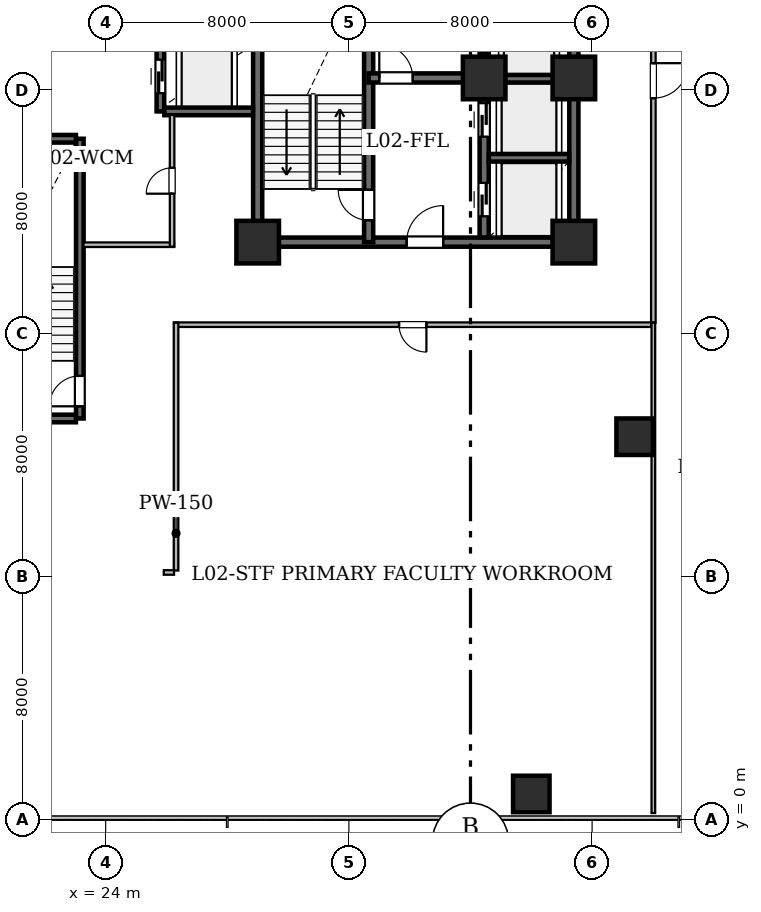
"""IFC4 building model, lengths in metres.
Left out: names, types, materials, properties, quantities, classifications, styles, units other than length and angle.
Written with IfcOpenShell. Run it as: python <this file> out.ifc"""

import sys

from ifc_helpers import new_model, si_unit, direction, frame, frame_2d, origin, origin_2d, place, context, subcontext, project, spatial, rectangle, hollow_rectangle, extrude, element, fill, save


model = new_model("IFC4")
c1 = context("Model", 3, precision=1e-05, world=origin(), true_north=direction((0.0, 1.0)))
c2 = subcontext(c1, "Body", "Model", "MODEL_VIEW")
j1 = project(units=[si_unit("LENGTHUNIT", "METRE"), si_unit("PLANEANGLEUNIT", "RADIAN")], contexts=[c1])
p1 = place(None, origin())
s1 = spatial("IfcSite", under=j1, at=p1, CompositionType="ELEMENT")
p2 = place(p1, origin())
s2 = spatial("IfcBuilding", under=s1, at=p2, CompositionType="ELEMENT")
p3 = place(p2, frame((0.0, 0.0, 12.0)))
s3 = spatial("IfcBuildingStorey", under=s2, at=p3, CompositionType="ELEMENT", Elevation=12.0)
for number, where, z_axis, x_axis in (
    (1, (29.0, 19.0, 0.0), (0.0, 0.0, 1.0), (1.0, 0.0, 0.0)),
    (2, (39.4, 19.0, 0.0), (0.0, 0.0, 1.0), (1.0, 0.0, 0.0)),
    (3, (36.45, 24.4, 0.0), (0.0, 0.0, 1.0), (1.0, 0.0, 0.0)),
    (4, (39.4, 24.4, 0.0), (0.0, 0.0, 1.0), (1.0, 0.0, 0.0)),
):
    element("IfcColumn", number, at=place(p3, frame(where, z_axis=z_axis, x_axis=x_axis)), inside=s3, PredefinedType="COLUMN", context=c2, shape_type="SweptSolid", body=[
        extrude(hollow_rectangle(XDim=1.4, YDim=1.4, WallThickness=0.07, at=origin_2d()), origin(), (0.0, 0.0, 1.0), 4.2),
    ])
for number, where, z_axis, x_axis in (
    (5, (38.0, 0.85, 0.0), (0.0, 0.0, 1.0), (1.0, 0.0, 0.0)),
    (6, (41.4, 12.6, 0.0), (0.0, 0.0, 1.0), (1.0, 0.0, 0.0)),
):
    element("IfcColumn", number, at=place(p3, frame(where, z_axis=z_axis, x_axis=x_axis)), inside=s3, PredefinedType="COLUMN", context=c2, shape_type="SweptSolid", body=[
        extrude(hollow_rectangle(XDim=1.2, YDim=1.2, WallThickness=0.06, at=origin_2d()), origin(), (0.0, 0.0, 1.0), 4.2),
    ])
p4 = place(p3, frame((29.0, 19.0, 0.0), z_axis=(0.0, 0.0, 1.0), x_axis=(0.0, 1.0, 0.0)))
e7 = element("IfcWall", 7, at=p4, inside=s3, PredefinedType="SHEAR", context=c2, shape_type="SweptSolid", body=[
    extrude(rectangle(XDim=9.0, YDim=0.3, at=frame_2d((4.5, 0.0))), origin(), (0.0, 0.0, 1.0), 3.92),
])
p5 = place(p3, frame((29.0, 19.0, 0.0), z_axis=(0.0, 0.0, 1.0), x_axis=(1.0, 0.0, 0.0)))
e8 = element("IfcWall", 8, at=p5, inside=s3, PredefinedType="SHEAR", context=c2, shape_type="SweptSolid", body=[
    extrude(rectangle(XDim=10.4, YDim=0.3, at=frame_2d((5.2, 0.0))), origin(), (0.0, 0.0, 1.0), 3.92),
])
p6 = place(p5, frame((4.9, 0.0, 0.0)))
e9 = element("IfcOpeningElement", 9, at=p6, cuts=e8, PredefinedType="OPENING", context=c2, shape_type="SweptSolid", body=[
    extrude(rectangle(XDim=1.2, YDim=2.15, at=frame_2d((0.6, 1.075))), frame((0.0, 0.16, 0.0), z_axis=(0.0, -1.0, 0.0), x_axis=(1.0, 0.0, 0.0)), (0.0, 0.0, 1.0), 0.32),
])
p7 = place(p3, frame((39.4, 19.0, 0.0), z_axis=(0.0, 0.0, 1.0), x_axis=(0.0, 1.0, 0.0)))
e10 = element("IfcWall", 10, at=p7, inside=s3, PredefinedType="SHEAR", context=c2, shape_type="SweptSolid", body=[
    extrude(rectangle(XDim=5.4, YDim=0.3, at=frame_2d((2.7, 0.0))), origin(), (0.0, 0.0, 1.0), 3.92),
])
p8 = place(p3, frame((39.4, 24.4, 0.0), z_axis=(0.0, 0.0, 1.0), x_axis=(0.0, 1.0, 0.0)))
e11 = element("IfcWall", 11, at=p8, inside=s3, PredefinedType="SHEAR", context=c2, shape_type="SweptSolid", body=[
    extrude(rectangle(XDim=12.6, YDim=0.3, at=frame_2d((6.3, 0.0))), origin(), (0.0, 0.0, 1.0), 3.92),
])
p9 = place(p3, frame((32.65, 19.0, 0.0), z_axis=(0.0, 0.0, 1.0), x_axis=(0.0, 1.0, 0.0)))
e12 = element("IfcWall", 12, at=p9, inside=s3, PredefinedType="SHEAR", context=c2, shape_type="SweptSolid", body=[
    extrude(rectangle(XDim=9.0, YDim=0.3, at=frame_2d((4.5, 0.0))), origin(), (0.0, 0.0, 1.0), 3.92),
])
p10 = place(p9, frame((0.72, 0.0, 0.0)))
e13 = element("IfcOpeningElement", 13, at=p10, cuts=e12, PredefinedType="OPENING", context=c2, shape_type="SweptSolid", body=[
    extrude(rectangle(XDim=1.0, YDim=2.15, at=frame_2d((0.5, 1.075))), frame((0.0, 0.16, 0.0), z_axis=(0.0, -1.0, 0.0), x_axis=(1.0, 0.0, 0.0)), (0.0, 0.0, 1.0), 0.32),
])
p11 = place(p3, frame((32.65, 24.4, 0.0), z_axis=(0.0, 0.0, 1.0), x_axis=(1.0, 0.0, 0.0)))
e14 = element("IfcWall", 14, at=p11, inside=s3, PredefinedType="SHEAR", context=c2, shape_type="SweptSolid", body=[
    extrude(rectangle(XDim=3.8, YDim=0.3, at=frame_2d((1.9, 0.0))), origin(), (0.0, 0.0, 1.0), 3.92),
])
p12 = place(p11, frame((0.35, 0.0, 0.0)))
e15 = element("IfcOpeningElement", 15, at=p12, cuts=e14, PredefinedType="OPENING", context=c2, shape_type="SweptSolid", body=[
    extrude(rectangle(XDim=1.1, YDim=2.15, at=frame_2d((0.55, 1.075))), frame((0.0, 0.16, 0.0), z_axis=(0.0, -1.0, 0.0), x_axis=(1.0, 0.0, 0.0)), (0.0, 0.0, 1.0), 0.32),
])
p13 = place(p3, frame((36.45, 19.154, 0.0), z_axis=(0.0, 0.0, 1.0), x_axis=(0.0, 1.0, 0.0)))
e16 = element("IfcWall", 16, at=p13, inside=s3, PredefinedType="SHEAR", context=c2, shape_type="SweptSolid", body=[
    extrude(rectangle(XDim=4.546, YDim=0.3, at=frame_2d((2.273, 0.0))), origin(), (0.0, 0.0, 1.0), 3.92),
])
p14 = place(p13, frame((0.696, 0.0, 0.0)))
e17 = element("IfcOpeningElement", 17, at=p14, cuts=e16, PredefinedType="OPENING", context=c2, shape_type="SweptSolid", body=[
    extrude(rectangle(XDim=1.1, YDim=2.15, at=frame_2d((0.55, 1.075))), frame((0.0, 0.16, 0.0), z_axis=(0.0, -1.0, 0.0), x_axis=(1.0, 0.0, 0.0)), (0.0, 0.0, 1.0), 0.32),
])
p15 = place(p13, frame((3.316, 0.0, 0.0)))
e18 = element("IfcOpeningElement", 18, at=p15, cuts=e16, PredefinedType="OPENING", context=c2, shape_type="SweptSolid", body=[
    extrude(rectangle(XDim=1.1, YDim=2.15, at=frame_2d((0.55, 1.075))), frame((0.0, 0.16, 0.0), z_axis=(0.0, -1.0, 0.0), x_axis=(1.0, 0.0, 0.0)), (0.0, 0.0, 1.0), 0.32),
])
p16 = place(p3, frame((36.45, 25.1, 0.0), z_axis=(0.0, 0.0, 1.0), x_axis=(0.0, 1.0, 0.0)))
e19 = element("IfcWall", 19, at=p16, inside=s3, PredefinedType="SHEAR", context=c2, shape_type="SweptSolid", body=[
    extrude(rectangle(XDim=4.95, YDim=0.3, at=frame_2d((2.475, 0.0))), origin(), (0.0, 0.0, 1.0), 3.92),
])
p17 = place(p16, frame((0.12, 0.0, 0.0)))
e20 = element("IfcOpeningElement", 20, at=p17, cuts=e19, PredefinedType="OPENING", context=c2, shape_type="SweptSolid", body=[
    extrude(rectangle(XDim=1.05, YDim=2.15, at=frame_2d((0.525, 1.075))), frame((0.0, 0.16, 0.0), z_axis=(0.0, -1.0, 0.0), x_axis=(1.0, 0.0, 0.0)), (0.0, 0.0, 1.0), 0.32),
])
p18 = place(p16, frame((1.995, 0.0, 0.0)))
e21 = element("IfcOpeningElement", 21, at=p18, cuts=e19, PredefinedType="OPENING", context=c2, shape_type="SweptSolid", body=[
    extrude(rectangle(XDim=1.05, YDim=2.15, at=frame_2d((0.525, 1.075))), frame((0.0, 0.16, 0.0), z_axis=(0.0, -1.0, 0.0), x_axis=(1.0, 0.0, 0.0)), (0.0, 0.0, 1.0), 0.32),
])
p19 = place(p16, frame((3.795, 0.0, 0.0)))
e22 = element("IfcOpeningElement", 22, at=p19, cuts=e19, PredefinedType="OPENING", context=c2, shape_type="SweptSolid", body=[
    extrude(rectangle(XDim=1.05, YDim=2.15, at=frame_2d((0.525, 1.075))), frame((0.0, 0.16, 0.0), z_axis=(0.0, -1.0, 0.0), x_axis=(1.0, 0.0, 0.0)), (0.0, 0.0, 1.0), 0.32),
])
for number, where, z_axis, x_axis in (
    (23, (36.604, 21.775, 0.0), (0.0, 0.0, 1.0), (1.0, 0.0, 0.0)),
    (24, (36.604, 24.375, 0.0), (0.0, 0.0, 1.0), (1.0, 0.0, 0.0)),
):
    element("IfcWall", number, at=place(p3, frame(where, z_axis=z_axis, x_axis=x_axis)), inside=s3, PredefinedType="SHEAR", context=c2, shape_type="SweptSolid", body=[
        extrude(rectangle(XDim=2.642, YDim=0.25, at=frame_2d((1.321, 0.0))), origin(), (0.0, 0.0, 1.0), 3.92),
    ])
p20 = place(p3, frame((23.15, 13.2, 0.0), z_axis=(0.0, 0.0, 1.0), x_axis=(0.0, 1.0, 0.0)))
e25 = element("IfcWall", 25, at=p20, inside=s3, PredefinedType="SHEAR", context=c2, shape_type="SweptSolid", body=[
    extrude(rectangle(XDim=9.2, YDim=0.25, at=frame_2d((4.6, 0.0))), origin(), (0.0, 0.0, 1.0), 3.92),
])
p21 = place(p20, frame((0.4, 0.0, 0.0)))
e26 = element("IfcOpeningElement", 26, at=p21, cuts=e25, PredefinedType="OPENING", context=c2, shape_type="SweptSolid", body=[
    extrude(rectangle(XDim=1.0, YDim=2.15, at=frame_2d((0.5, 1.075))), frame((0.0, 0.135, 0.0), z_axis=(0.0, -1.0, 0.0), x_axis=(1.0, 0.0, 0.0)), (0.0, 0.0, 1.0), 0.27),
])
for number, where, z_axis, x_axis in (
    (27, (19.329, 13.2, 0.0), (0.0, 0.0, 1.0), (1.0, 0.0, 0.0)),
    (28, (19.329, 22.4, 0.0), (0.0, 0.0, 1.0), (1.0, 0.0, 0.0)),
):
    element("IfcWall", number, at=place(p3, frame(where, z_axis=z_axis, x_axis=x_axis)), inside=s3, PredefinedType="SHEAR", context=c2, shape_type="SweptSolid", body=[
        extrude(rectangle(XDim=3.692, YDim=0.25, at=frame_2d((1.846, 0.0))), origin(), (0.0, 0.0, 1.0), 3.92),
    ])
p22 = place(p3, frame((25.8, 23.3, 0.0), z_axis=(0.0, 0.0, 1.0), x_axis=(0.0, 1.0, 0.0)))
e29 = element("IfcWall", 29, at=p22, inside=s3, PredefinedType="SHEAR", context=c2, shape_type="SweptSolid", body=[
    extrude(rectangle(XDim=4.55, YDim=0.25, at=frame_2d((2.275, 0.0))), origin(), (0.0, 0.0, 1.0), 3.92),
])
p23 = place(p22, frame((0.6, 0.0, 0.0)))
e30 = element("IfcOpeningElement", 30, at=p23, cuts=e29, PredefinedType="OPENING", context=c2, shape_type="SweptSolid", body=[
    extrude(rectangle(XDim=1.1, YDim=2.15, at=frame_2d((0.55, 1.075))), frame((0.0, 0.135, 0.0), z_axis=(0.0, -1.0, 0.0), x_axis=(1.0, 0.0, 0.0)), (0.0, 0.0, 1.0), 0.27),
])
p24 = place(p22, frame((2.85, 0.0, 0.0)))
e31 = element("IfcOpeningElement", 31, at=p24, cuts=e29, PredefinedType="OPENING", context=c2, shape_type="SweptSolid", body=[
    extrude(rectangle(XDim=1.1, YDim=2.15, at=frame_2d((0.55, 1.075))), frame((0.0, 0.135, 0.0), z_axis=(0.0, -1.0, 0.0), x_axis=(1.0, 0.0, 0.0)), (0.0, 0.0, 1.0), 0.27),
])
p25 = place(p3, frame((25.929, 23.3, 0.0), z_axis=(0.0, 0.0, 1.0), x_axis=(1.0, 0.0, 0.0)))
e32 = element("IfcWall", 32, at=p25, inside=s3, PredefinedType="SHEAR", context=c2, shape_type="SweptSolid", body=[
    extrude(rectangle(XDim=2.917, YDim=0.25, at=frame_2d((1.458, 0.0))), origin(), (0.0, 0.0, 1.0), 3.92),
])
p26 = place(p3, frame((23.267, 18.915, 0.0), z_axis=(0.0, 0.0, 1.0), x_axis=(1.0, 0.0, 0.0)))
e33 = element("IfcWall", 33, at=p26, inside=s3, PredefinedType="STANDARD", context=c2, shape_type="SweptSolid", body=[
    extrude(rectangle(XDim=2.983, YDim=0.15, at=frame_2d((1.491, 0.0))), origin(), (0.0, 0.0, 1.0), 3.92),
])
p27 = place(p3, frame((26.185, 18.852, 0.0), z_axis=(0.0, 0.0, 1.0), x_axis=(0.0, 1.0, 0.0)))
e34 = element("IfcWall", 34, at=p27, inside=s3, PredefinedType="STANDARD", context=c2, shape_type="SweptSolid", body=[
    extrude(rectangle(XDim=4.331, YDim=0.15, at=frame_2d((2.166, 0.0))), origin(), (0.0, 0.0, 1.0), 3.92),
])
p28 = place(p27, frame((1.741, 0.0, 0.0)))
e35 = element("IfcOpeningElement", 35, at=p28, cuts=e34, PredefinedType="OPENING", context=c2, shape_type="SweptSolid", body=[
    extrude(rectangle(XDim=0.85, YDim=2.1, at=frame_2d((0.425, 1.05))), frame((0.0, 0.085, 0.0), z_axis=(0.0, -1.0, 0.0), x_axis=(1.0, 0.0, 0.0)), (0.0, 0.0, 1.0), 0.17),
])
p29 = place(p3, frame((42.015, 32.314, 0.0), z_axis=(0.0, 0.0, 1.0), x_axis=(0.0, -1.0, 0.0)))
e36 = element("IfcWall", 36, at=p29, inside=s3, PredefinedType="STANDARD", context=c2, shape_type="SweptSolid", body=[
    extrude(rectangle(XDim=15.964, YDim=0.15, at=frame_2d((7.982, 0.0))), origin(), (0.0, 0.0, 1.0), 3.055),
])
p30 = place(p29, frame((7.428, 0.0, 0.0)))
e37 = element("IfcOpeningElement", 37, at=p30, cuts=e36, PredefinedType="OPENING", context=c2, shape_type="SweptSolid", body=[
    extrude(rectangle(XDim=1.15, YDim=2.2, at=frame_2d((0.575, 1.1))), frame((0.0, 0.085, 0.0), z_axis=(0.0, -1.0, 0.0), x_axis=(1.0, 0.0, 0.0)), (0.0, 0.0, 1.0), 0.17),
])
p31 = place(p3, frame((41.95, 16.285, 0.0), z_axis=(0.0, 0.0, 1.0), x_axis=(-1.0, 0.0, 0.0)))
e38 = element("IfcWall", 38, at=p31, inside=s3, PredefinedType="STANDARD", context=c2, shape_type="SweptSolid", body=[
    extrude(rectangle(XDim=15.7, YDim=0.15, at=frame_2d((7.85, 0.0))), origin(), (0.0, 0.0, 1.0), 3.055),
])
p32 = place(p31, frame((7.4, 0.0, 0.0)))
e39 = element("IfcOpeningElement", 39, at=p32, cuts=e38, PredefinedType="OPENING", context=c2, shape_type="SweptSolid", body=[
    extrude(rectangle(XDim=0.9, YDim=2.1, at=frame_2d((0.45, 1.05))), frame((0.0, 0.085, 0.0), z_axis=(0.0, -1.0, 0.0), x_axis=(1.0, 0.0, 0.0)), (0.0, 0.0, 1.0), 0.17),
])
p33 = place(p3, frame((26.315, 16.35, 0.0), z_axis=(0.0, 0.0, 1.0), x_axis=(0.0, -1.0, 0.0)))
e40 = element("IfcWall", 40, at=p33, inside=s3, PredefinedType="STANDARD", context=c2, shape_type="SweptSolid", body=[
    extrude(rectangle(XDim=8.15, YDim=0.15, at=frame_2d((4.075, 0.0))), origin(), (0.0, 0.0, 1.0), 3.055),
])
p34 = place(p3, frame((26.25, 8.135, 0.0), z_axis=(0.0, 0.0, 1.0), x_axis=(-1.0, 0.0, 0.0)))
e41 = element("IfcWall", 41, at=p34, inside=s3, PredefinedType="STANDARD", context=c2, shape_type="SweptSolid", body=[
    extrude(rectangle(XDim=0.339, YDim=0.15, at=frame_2d((0.169, 0.0))), origin(), (0.0, 0.0, 1.0), 3.92),
])
p35 = place(p3, frame((42.015, 0.222, 0.0), z_axis=(0.0, 0.0, 1.0), x_axis=(0.0, 1.0, 0.0)))
e42 = element("IfcWall", 42, at=p35, inside=s3, PredefinedType="PARTITIONING", context=c2, shape_type="SweptSolid", body=[
    extrude(rectangle(XDim=16.128, YDim=0.12, at=frame_2d((8.064, 0.0))), origin(), (0.0, 0.0, 1.0), 3.055),
])
p36 = place(p10, origin())
e43 = element("IfcDoor", 43, at=p36, inside=s3, OperationType="SINGLE_SWING_RIGHT", PredefinedType="DOOR", context=c2, shape_type="SweptSolid", body=[
    extrude(rectangle(XDim=1.0, YDim=2.15, at=frame_2d((0.5, 1.075))), frame((0.0, 0.025, 0.0), z_axis=(0.0, -1.0, 0.0), x_axis=(1.0, 0.0, 0.0)), (0.0, 0.0, 1.0), 0.05),
])
fill(e13, e43)
p37 = place(p12, origin())
e44 = element("IfcDoor", 44, at=p37, inside=s3, OperationType="SINGLE_SWING_LEFT", PredefinedType="DOOR", context=c2, shape_type="SweptSolid", body=[
    extrude(rectangle(XDim=1.1, YDim=2.15, at=frame_2d((0.55, 1.075))), frame((0.0, 0.025, 0.0), z_axis=(0.0, -1.0, 0.0), x_axis=(1.0, 0.0, 0.0)), (0.0, 0.0, 1.0), 0.05),
])
fill(e15, e44)
p38 = place(p6, origin())
e45 = element("IfcDoor", 45, at=p38, inside=s3, OperationType="SINGLE_SWING_RIGHT", PredefinedType="DOOR", context=c2, shape_type="SweptSolid", body=[
    extrude(rectangle(XDim=1.2, YDim=2.15, at=frame_2d((0.6, 1.075))), frame((0.0, 0.025, 0.0), z_axis=(0.0, -1.0, 0.0), x_axis=(1.0, 0.0, 0.0)), (0.0, 0.0, 1.0), 0.05),
])
fill(e9, e45)
p39 = place(p14, origin())
e46 = element("IfcDoor", 46, at=p39, inside=s3, OperationType="SLIDING_TO_LEFT", PredefinedType="DOOR", context=c2, shape_type="SweptSolid", body=[
    extrude(rectangle(XDim=1.1, YDim=2.15, at=frame_2d((0.55, 1.075))), frame((0.0, 0.025, 0.0), z_axis=(0.0, -1.0, 0.0), x_axis=(1.0, 0.0, 0.0)), (0.0, 0.0, 1.0), 0.05),
])
fill(e17, e46)
p40 = place(p15, origin())
e47 = element("IfcDoor", 47, at=p40, inside=s3, OperationType="SLIDING_TO_LEFT", PredefinedType="DOOR", context=c2, shape_type="SweptSolid", body=[
    extrude(rectangle(XDim=1.1, YDim=2.15, at=frame_2d((0.55, 1.075))), frame((0.0, 0.025, 0.0), z_axis=(0.0, -1.0, 0.0), x_axis=(1.0, 0.0, 0.0)), (0.0, 0.0, 1.0), 0.05),
])
fill(e18, e47)
p41 = place(p17, origin())
e48 = element("IfcDoor", 48, at=p41, inside=s3, OperationType="SLIDING_TO_LEFT", PredefinedType="DOOR", context=c2, shape_type="SweptSolid", body=[
    extrude(rectangle(XDim=1.05, YDim=2.15, at=frame_2d((0.525, 1.075))), frame((0.0, 0.025, 0.0), z_axis=(0.0, -1.0, 0.0), x_axis=(1.0, 0.0, 0.0)), (0.0, 0.0, 1.0), 0.05),
])
fill(e20, e48)
p42 = place(p21, origin())
e49 = element("IfcDoor", 49, at=p42, inside=s3, OperationType="SINGLE_SWING_LEFT", PredefinedType="DOOR", context=c2, shape_type="SweptSolid", body=[
    extrude(rectangle(XDim=1.0, YDim=2.15, at=frame_2d((0.5, 1.075))), frame((0.0, 0.025, 0.0), z_axis=(0.0, -1.0, 0.0), x_axis=(1.0, 0.0, 0.0)), (0.0, 0.0, 1.0), 0.05),
])
fill(e26, e49)
p43 = place(p23, origin())
e50 = element("IfcDoor", 50, at=p43, inside=s3, OperationType="SLIDING_TO_LEFT", PredefinedType="DOOR", context=c2, shape_type="SweptSolid", body=[
    extrude(rectangle(XDim=1.1, YDim=2.15, at=frame_2d((0.55, 1.075))), frame((0.0, 0.025, 0.0), z_axis=(0.0, -1.0, 0.0), x_axis=(1.0, 0.0, 0.0)), (0.0, 0.0, 1.0), 0.05),
])
fill(e30, e50)
p44 = place(p28, origin())
e51 = element("IfcDoor", 51, at=p44, inside=s3, OperationType="SINGLE_SWING_LEFT", PredefinedType="DOOR", context=c2, shape_type="SweptSolid", body=[
    extrude(rectangle(XDim=0.85, YDim=2.1, at=frame_2d((0.425, 1.05))), frame((0.0, 0.025, 0.0), z_axis=(0.0, -1.0, 0.0), x_axis=(1.0, 0.0, 0.0)), (0.0, 0.0, 1.0), 0.05),
])
fill(e35, e51)
p45 = place(p30, origin())
e52 = element("IfcDoor", 52, at=p45, inside=s3, OperationType="SINGLE_SWING_LEFT", PredefinedType="DOOR", context=c2, shape_type="SweptSolid", body=[
    extrude(rectangle(XDim=1.15, YDim=2.2, at=frame_2d((0.575, 1.1))), frame((0.0, 0.025, 0.0), z_axis=(0.0, -1.0, 0.0), x_axis=(1.0, 0.0, 0.0)), (0.0, 0.0, 1.0), 0.05),
])
fill(e37, e52)
p46 = place(p32, origin())
e53 = element("IfcDoor", 53, at=p46, inside=s3, OperationType="SINGLE_SWING_LEFT", PredefinedType="DOOR", context=c2, shape_type="SweptSolid", body=[
    extrude(rectangle(XDim=0.9, YDim=2.1, at=frame_2d((0.45, 1.05))), frame((0.0, 0.025, 0.0), z_axis=(0.0, -1.0, 0.0), x_axis=(1.0, 0.0, 0.0)), (0.0, 0.0, 1.0), 0.05),
])
fill(e39, e53)
save(model, sys.argv[1])
